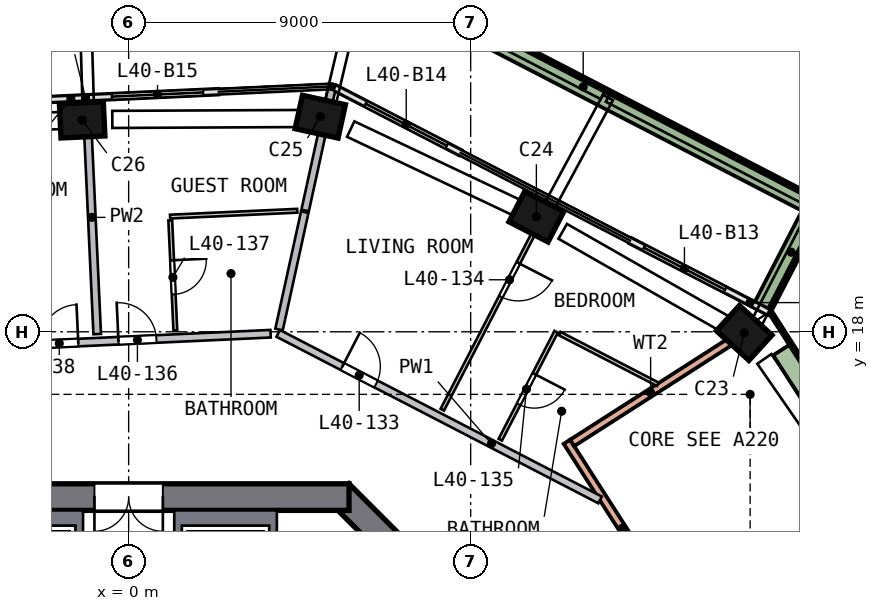
"""IFC4 building model, lengths in metres.
Left out: names, types, materials, properties, quantities, classifications, styles, units other than length and angle.
Written with IfcOpenShell. Run it as: python <this file> out.ifc"""

import sys

from ifc_helpers import new_model, si_unit, direction, frame, frame_2d, origin, origin_2d, place, context, subcontext, project, spatial, polyline, rectangle, outline, extrude, element, fill, save


model = new_model("IFC4")
c1 = context("Model", 3, precision=1e-05, world=origin(), true_north=direction((0.0, 1.0)))
c2 = subcontext(c1, "Body", "Model", "MODEL_VIEW")
j1 = project(units=[si_unit("LENGTHUNIT", "METRE"), si_unit("PLANEANGLEUNIT", "RADIAN")], contexts=[c1])
p1 = place(None, origin())
s1 = spatial("IfcSite", under=j1, at=p1, CompositionType="ELEMENT")
p2 = place(p1, origin())
s2 = spatial("IfcBuilding", under=s1, at=p2, CompositionType="ELEMENT")
p3 = place(p2, frame((0.0, 0.0, 165.5)))
s3 = spatial("IfcBuildingStorey", under=s2, at=p3, CompositionType="ELEMENT", Elevation=165.5)
p4 = place(p3, frame((16.301, 17.877, 0.0), z_axis=(-0.08569056, 0.076717303, 0.993363772), x_axis=(0.734443295, -0.668853924, 0.115010764)))
e1 = element("IfcColumn", 1, at=p4, inside=s3, PredefinedType="COLUMN", context=c2, shape_type="SweptSolid", body=[
    extrude(rectangle(XDim=1.15, YDim=0.9, at=origin_2d()), origin(), (0.0, 0.0, 1.0), 3.02),
])
p5 = place(p3, frame((10.85, 20.967, 0.0), z_axis=(-0.100111899, 0.050783742, 0.993679334), x_axis=(-0.882336041, 0.457036789, -0.112251882)))
e2 = element("IfcColumn", 2, at=p5, inside=s3, PredefinedType="COLUMN", context=c2, shape_type="SweptSolid", body=[
    extrude(rectangle(XDim=1.15, YDim=0.9, at=origin_2d()), origin(), (0.0, 0.0, 1.0), 3.019),
])
p6 = place(p3, frame((5.178, 23.632, 0.0), z_axis=(-0.112609342, 0.023766796, 0.99335506), x_axis=(0.970167516, -0.213378086, 0.115085979)))
e3 = element("IfcColumn", 3, at=p6, inside=s3, PredefinedType="COLUMN", context=c2, shape_type="SweptSolid", body=[
    extrude(rectangle(XDim=1.15, YDim=0.9, at=origin_2d()), origin(), (0.0, 0.0, 1.0), 3.02),
])
p7 = place(p3, frame((-1.087, 23.583, 0.0), z_axis=(-0.112159985, -0.006145753, 0.993671157), x_axis=(-0.992608833, -0.045945291, -0.112324243)))
e4 = element("IfcColumn", 4, at=p7, inside=s3, PredefinedType="COLUMN", context=c2, shape_type="SweptSolid", body=[
    extrude(rectangle(XDim=1.15, YDim=0.9, at=origin_2d()), origin(), (0.0, 0.0, 1.0), 3.019),
])
p8 = place(p3, frame((13.752, 5.552, 0.0), z_axis=(0.0, 0.0, 1.0), x_axis=(-0.707106781, 0.707106781, 0.0)))
e5 = element("IfcWall", 5, at=p8, inside=s3, PredefinedType="SHEAR", context=c2, shape_type="SweptSolid", body=[
    extrude(rectangle(XDim=11.598, YDim=0.7, at=frame_2d((5.799, 0.0))), origin(), (0.0, 0.0, 1.0), 3.5),
])
p9 = place(p8, frame((2.099, 0.0, 0.0)))
e6 = element("IfcOpeningElement", 6, at=p9, cuts=e5, PredefinedType="OPENING", context=c2, shape_type="SweptSolid", body=[
    extrude(rectangle(XDim=1.2, YDim=2.1, at=frame_2d((0.6, 1.05))), frame((0.0, 0.36, 0.0), z_axis=(0.0, -1.0, 0.0), x_axis=(1.0, 0.0, 0.0)), (0.0, 0.0, 1.0), 0.72),
])
p10 = place(p3, frame((5.799, 13.65, 0.0), z_axis=(0.0, 0.0, 1.0), x_axis=(-1.0, 0.0, 0.0)))
e7 = element("IfcWall", 7, at=p10, inside=s3, PredefinedType="SHEAR", context=c2, shape_type="SweptSolid", body=[
    extrude(rectangle(XDim=11.598, YDim=0.7, at=frame_2d((5.799, 0.0))), origin(), (0.0, 0.0, 1.0), 3.5),
])
p11 = place(p10, frame((4.899, 0.0, 0.0)))
e8 = element("IfcOpeningElement", 8, at=p11, cuts=e7, PredefinedType="OPENING", context=c2, shape_type="SweptSolid", body=[
    extrude(rectangle(XDim=1.8, YDim=2.1, at=frame_2d((0.9, 1.05))), frame((0.0, 0.36, 0.0), z_axis=(0.0, -1.0, 0.0), x_axis=(1.0, 0.0, 0.0)), (0.0, 0.0, 1.0), 0.72),
])
p12 = place(p3, frame((16.834, 18.518, 0.0), z_axis=(0.0, 0.0, 1.0), x_axis=(-0.888127677, 0.459596813, 0.0)))
e9 = element("IfcWall", 9, at=p12, inside=s3, PredefinedType="SOLIDWALL", context=c2, shape_type="SweptSolid", body=[
    extrude(rectangle(XDim=4.087, YDim=0.15, at=frame_2d((2.043, 0.0))), origin(), (0.0, 0.0, 1.0), 2.935),
])
p13 = place(p12, frame((1.287, 0.0, 0.0)))
e10 = element("IfcOpeningElement", 10, at=p13, cuts=e9, PredefinedType="OPENING", context=c2, shape_type="SweptSolid", body=[
    extrude(rectangle(XDim=2.4, YDim=2.4, at=frame_2d((1.2, 1.2))), frame((0.0, 0.085, 0.0), z_axis=(0.0, -1.0, 0.0), x_axis=(1.0, 0.0, 0.0)), (0.0, 0.0, 1.0), 0.17),
])
p14 = place(p3, frame((8.725, 22.714, 0.0), z_axis=(0.0, 0.0, 1.0), x_axis=(-0.888115772, 0.459619817, 0.0)))
e11 = element("IfcWall", 11, at=p14, inside=s3, PredefinedType="SOLIDWALL", context=c2, shape_type="SweptSolid", body=[
    extrude(rectangle(XDim=3.71, YDim=0.15, at=frame_2d((1.855, 0.0))), origin(), (0.0, 0.0, 1.0), 2.935),
])
p15 = place(p14, frame((0.4, 0.0, 0.0)))
e12 = element("IfcOpeningElement", 12, at=p15, cuts=e11, PredefinedType="OPENING", context=c2, shape_type="SweptSolid", body=[
    extrude(rectangle(XDim=2.4, YDim=2.4, at=frame_2d((1.2, 1.2))), frame((0.0, 0.085, 0.0), z_axis=(0.0, -1.0, 0.0), x_axis=(1.0, 0.0, 0.0)), (0.0, 0.0, 1.0), 0.17),
])
p16 = place(p3, frame((2.357, 24.318, 0.0), z_axis=(0.0, 0.0, 1.0), x_axis=(-0.998940688, -0.046016327, 0.0)))
e13 = element("IfcWall", 13, at=p16, inside=s3, PredefinedType="SOLIDWALL", context=c2, shape_type="SweptSolid", body=[
    extrude(rectangle(XDim=3.475, YDim=0.15, at=frame_2d((1.738, 0.0))), origin(), (0.0, 0.0, 1.0), 2.935),
])
p17 = place(p16, frame((0.4, 0.0, 0.0)))
e14 = element("IfcOpeningElement", 14, at=p17, cuts=e13, PredefinedType="OPENING", context=c2, shape_type="SweptSolid", body=[
    extrude(rectangle(XDim=2.4, YDim=2.4, at=frame_2d((1.2, 1.2))), frame((0.0, 0.085, 0.0), z_axis=(0.0, -1.0, 0.0), x_axis=(1.0, 0.0, 0.0)), (0.0, 0.0, 1.0), 0.17),
])
p18 = place(p3, frame((-1.114, 24.158, 0.0), z_axis=(0.0, 0.0, 1.0), x_axis=(-0.99893729, -0.046090026, 0.0)))
e15 = element("IfcWall", 15, at=p18, inside=s3, PredefinedType="SOLIDWALL", context=c2, shape_type="SweptSolid", body=[
    extrude(rectangle(XDim=3.814, YDim=0.15, at=frame_2d((1.907, 0.0))), origin(), (0.0, 0.0, 1.0), 2.935),
])
p19 = place(p18, frame((1.014, 0.0, 0.0)))
e16 = element("IfcOpeningElement", 16, at=p19, cuts=e15, PredefinedType="OPENING", context=c2, shape_type="SweptSolid", body=[
    extrude(rectangle(XDim=2.4, YDim=2.4, at=frame_2d((1.2, 1.2))), frame((0.0, 0.085, 0.0), z_axis=(0.0, -1.0, 0.0), x_axis=(1.0, 0.0, 0.0)), (0.0, 0.0, 1.0), 0.17),
])
p20 = place(p3, frame((16.7, 18.673, 0.0), z_axis=(0.0, 0.0, 1.0), x_axis=(0.459595237, 0.888128492, 0.0)))
e17 = element("IfcWall", 17, at=p20, inside=s3, PredefinedType="SOLIDWALL", context=c2, shape_type="SweptSolid", body=[
    extrude(rectangle(XDim=3.199, YDim=0.5, at=frame_2d((1.6, 0.0))), origin(), (0.0, 0.0, 1.0), 0.7),
])
p21 = place(p3, frame((17.833, 21.407, 0.0), z_axis=(0.0, 0.0, 1.0), x_axis=(-0.888141512, 0.459570076, 0.0)))
e18 = element("IfcWall", 18, at=p21, inside=s3, PredefinedType="SOLIDWALL", context=c2, shape_type="SweptSolid", body=[
    extrude(rectangle(XDim=13.224, YDim=0.5, at=frame_2d((6.612, 0.0))), origin(), (0.0, 0.0, 1.0), 0.7),
])
p22 = place(p3, frame((11.532, 15.105, 0.0), z_axis=(0.0, 0.0, 1.0), x_axis=(0.53936062, -0.842074891, 0.0)))
e19 = element("IfcWall", 19, at=p22, inside=s3, PredefinedType="SOLIDWALL", context=c2, shape_type="SweptSolid", body=[
    extrude(rectangle(XDim=13.0, YDim=0.2, at=frame_2d((6.5, 0.0))), origin(), (0.0, 0.0, 1.0), 3.0),
])
p23 = place(p22, frame((5.6, 0.0, 0.0)))
e20 = element("IfcOpeningElement", 20, at=p23, cuts=e19, PredefinedType="OPENING", context=c2, shape_type="SweptSolid", body=[
    extrude(rectangle(XDim=1.8, YDim=2.4, at=frame_2d((0.9, 1.2))), frame((0.0, 0.11, 0.0), z_axis=(0.0, -1.0, 0.0), x_axis=(1.0, 0.0, 0.0)), (0.0, 0.0, 1.0), 0.22),
])
p24 = place(p3, frame((15.8, 17.72, 0.0), z_axis=(0.0, 0.0, 1.0), x_axis=(-0.842081483, -0.539350327, 0.0)))
e21 = element("IfcWall", 21, at=p24, inside=s3, PredefinedType="SOLIDWALL", context=c2, shape_type="SweptSolid", body=[
    extrude(rectangle(XDim=4.904, YDim=0.2, at=frame_2d((2.452, 0.0))), origin(), (0.0, 0.0, 1.0), 3.0),
])
p25 = place(p3, frame((23.848, 7.651, 0.0), z_axis=(0.0, 0.0, 1.0), x_axis=(-0.539354737, 0.842078659, 0.0)))
e22 = element("IfcWall", 22, at=p25, inside=s3, PredefinedType="SOLIDWALL", context=c2, shape_type="SweptSolid", body=[
    extrude(rectangle(XDim=12.84, YDim=0.1, at=frame_2d((6.42, 0.0))), origin(), (0.0, 0.0, 1.0), 0.7),
])
p26 = place(p3, frame((19.586, 13.749, 0.0), z_axis=(0.0, 0.0, 1.0), x_axis=(-0.539375623, 0.842065281, 0.0)))
e23 = element("IfcWall", 23, at=p26, inside=s3, PredefinedType="SOLIDWALL", context=c2, shape_type="SweptSolid", body=[
    extrude(rectangle(XDim=4.476, YDim=0.5, at=frame_2d((2.238, 0.0))), origin(), (0.0, 0.0, 1.0), 0.7),
])
p27 = place(p3, origin())
e24 = element("IfcWall", 24, at=p27, inside=s3, PredefinedType="SOLIDWALL", context=c2, shape_type="SweptSolid", body=[
    extrude(outline(polyline([(3.9, 13.3), (3.9, 10.9), (3.7, 10.9), (3.7, 12.9), (1.4, 12.9), (1.4, 10.9), (1.2, 10.9), (1.2, 13.3), (3.9, 13.3)])), origin(), (0.0, 0.0, 1.0), 3.0),
])
p28 = place(p3, origin())
e25 = element("IfcWall", 25, at=p28, inside=s3, PredefinedType="SOLIDWALL", context=c2, shape_type="SweptSolid", body=[
    extrude(outline(polyline([(-3.9, 10.9), (-3.9, 13.3), (-1.2, 13.3), (-1.2, 10.9), (-1.4, 10.9), (-1.4, 12.9), (-3.7, 12.9), (-3.7, 10.9), (-3.9, 10.9)])), origin(), (0.0, 0.0, 1.0), 3.0),
])
p29 = place(p3, frame((-5.571, 17.52, 0.0), z_axis=(0.0, 0.0, 1.0), x_axis=(0.998938336, 0.046067354, 0.0)))
e26 = element("IfcWall", 26, at=p29, inside=s3, PredefinedType="SOLIDWALL", context=c2, shape_type="SweptSolid", body=[
    extrude(rectangle(XDim=9.317, YDim=0.2, at=frame_2d((4.658, 0.0))), origin(), (0.0, 0.0, 1.0), 3.0),
])
p30 = place(p29, frame((5.308, 0.0, 0.0)))
e27 = element("IfcOpeningElement", 27, at=p30, cuts=e26, PredefinedType="OPENING", context=c2, shape_type="SweptSolid", body=[
    extrude(rectangle(XDim=1.0, YDim=2.1, at=frame_2d((0.5, 1.05))), frame((0.0, 0.11, 0.0), z_axis=(0.0, -1.0, 0.0), x_axis=(1.0, 0.0, 0.0)), (0.0, 0.0, 1.0), 0.22),
])
p31 = place(p29, frame((3.25, 0.0, 0.0)))
e28 = element("IfcOpeningElement", 28, at=p31, cuts=e26, PredefinedType="OPENING", context=c2, shape_type="SweptSolid", body=[
    extrude(rectangle(XDim=1.0, YDim=2.1, at=frame_2d((0.5, 1.05))), frame((0.0, 0.11, 0.0), z_axis=(0.0, -1.0, 0.0), x_axis=(1.0, 0.0, 0.0)), (0.0, 0.0, 1.0), 0.22),
])
p32 = place(p3, frame((3.935, 17.959, 0.0), z_axis=(0.0, 0.0, 1.0), x_axis=(0.888130454, -0.459591446, 0.0)))
e29 = element("IfcWall", 29, at=p32, inside=s3, PredefinedType="SOLIDWALL", context=c2, shape_type="SweptSolid", body=[
    extrude(rectangle(XDim=9.537, YDim=0.2, at=frame_2d((4.769, 0.0))), origin(), (0.0, 0.0, 1.0), 3.0),
])
p33 = place(p32, frame((1.9, 0.0, 0.0)))
e30 = element("IfcOpeningElement", 30, at=p33, cuts=e29, PredefinedType="OPENING", context=c2, shape_type="SweptSolid", body=[
    extrude(rectangle(XDim=1.0, YDim=2.1, at=frame_2d((0.5, 1.05))), frame((0.0, 0.11, 0.0), z_axis=(0.0, -1.0, 0.0), x_axis=(1.0, 0.0, 0.0)), (0.0, 0.0, 1.0), 0.22),
])
p34 = place(p3, frame((-0.827, 17.939, 0.0), z_axis=(0.0, 0.0, 1.0), x_axis=(-0.046048699, 0.998939196, 0.0)))
e31 = element("IfcWall", 31, at=p34, inside=s3, PredefinedType="SOLIDWALL", context=c2, shape_type="SweptSolid", body=[
    extrude(rectangle(XDim=6.15, YDim=0.2, at=frame_2d((3.075, 0.0))), origin(), (0.0, 0.0, 1.0), 3.0),
])
p35 = place(p3, frame((3.958, 18.06, 0.0), z_axis=(0.0, 0.0, 1.0), x_axis=(0.214067658, 0.976818836, 0.0)))
e32 = element("IfcWall", 32, at=p35, inside=s3, PredefinedType="SOLIDWALL", context=c2, shape_type="SweptSolid", body=[
    extrude(rectangle(XDim=3.161, YDim=0.2, at=frame_2d((1.581, 0.0))), origin(), (0.0, 0.0, 1.0), 3.0),
])
p36 = place(p3, frame((4.644, 21.193, 0.0), z_axis=(0.0, 0.0, 1.0), x_axis=(0.213995362, 0.976834676, 0.0)))
e33 = element("IfcWall", 33, at=p36, inside=s3, PredefinedType="SOLIDWALL", context=c2, shape_type="SweptSolid", body=[
    extrude(rectangle(XDim=3.269, YDim=0.2, at=frame_2d((1.634, 0.0))), origin(), (0.0, 0.0, 1.0), 3.0),
])
p37 = place(p3, frame((1.095, 20.931, 0.0), z_axis=(0.0, 0.0, 1.0), x_axis=(0.046053066, -0.998938995, 0.0)))
e34 = element("IfcWall", 34, at=p37, inside=s3, PredefinedType="PARTITIONING", context=c2, shape_type="SweptSolid", body=[
    extrude(rectangle(XDim=2.9, YDim=0.1, at=frame_2d((1.45, 0.0))), origin(), (0.0, 0.0, 1.0), 3.0),
])
p38 = place(p37, frame((1.05, 0.0, 0.0)))
e35 = element("IfcOpeningElement", 35, at=p38, cuts=e34, PredefinedType="OPENING", context=c2, shape_type="SweptSolid", body=[
    extrude(rectangle(XDim=0.9, YDim=2.1, at=frame_2d((0.45, 1.05))), frame((0.0, 0.06, 0.0), z_axis=(0.0, -1.0, 0.0), x_axis=(1.0, 0.0, 0.0)), (0.0, 0.0, 1.0), 0.12),
])
p39 = place(p3, frame((1.091, 21.031, 0.0), z_axis=(0.0, 0.0, 1.0), x_axis=(0.998938881, 0.046055542, 0.0)))
e36 = element("IfcWall", 36, at=p39, inside=s3, PredefinedType="PARTITIONING", context=c2, shape_type="SweptSolid", body=[
    extrude(rectangle(XDim=3.35, YDim=0.1, at=frame_2d((1.675, 0.0))), origin(), (0.0, 0.0, 1.0), 3.0),
])
p40 = place(p3, frame((11.08, 21.412, 0.0), z_axis=(0.0, 0.0, 1.0), x_axis=(-0.45954063, -0.888156748, 0.0)))
e37 = element("IfcWall", 37, at=p40, inside=s3, PredefinedType="PARTITIONING", context=c2, shape_type="SweptSolid", body=[
    extrude(rectangle(XDim=6.15, YDim=0.1, at=frame_2d((3.075, 0.0))), origin(), (0.0, 0.0, 1.0), 3.0),
])
p41 = place(p40, frame((1.8, 0.0, 0.0)))
e38 = element("IfcOpeningElement", 38, at=p41, cuts=e37, PredefinedType="OPENING", context=c2, shape_type="SweptSolid", body=[
    extrude(rectangle(XDim=1.0, YDim=2.1, at=frame_2d((0.5, 1.05))), frame((0.0, 0.06, 0.0), z_axis=(0.0, -1.0, 0.0), x_axis=(1.0, 0.0, 0.0)), (0.0, 0.0, 1.0), 0.12),
])
p42 = place(p3, frame((11.25, 18.002, 0.0), z_axis=(0.0, 0.0, 1.0), x_axis=(-0.459591028, -0.88813067, 0.0)))
e39 = element("IfcWall", 39, at=p42, inside=s3, PredefinedType="PARTITIONING", context=c2, shape_type="SweptSolid", body=[
    extrude(rectangle(XDim=3.2, YDim=0.1, at=frame_2d((1.6, 0.0))), origin(), (0.0, 0.0, 1.0), 3.0),
])
p43 = place(p42, frame((1.25, 0.0, 0.0)))
e40 = element("IfcOpeningElement", 40, at=p43, cuts=e39, PredefinedType="OPENING", context=c2, shape_type="SweptSolid", body=[
    extrude(rectangle(XDim=0.9, YDim=2.1, at=frame_2d((0.45, 1.05))), frame((0.0, 0.06, 0.0), z_axis=(0.0, -1.0, 0.0), x_axis=(1.0, 0.0, 0.0)), (0.0, 0.0, 1.0), 0.12),
])
p44 = place(p3, frame((13.925, 16.618, 0.0), z_axis=(0.0, 0.0, 1.0), x_axis=(-0.888153926, 0.459546084, 0.0)))
e41 = element("IfcWall", 41, at=p44, inside=s3, PredefinedType="PARTITIONING", context=c2, shape_type="SweptSolid", body=[
    extrude(rectangle(XDim=2.912, YDim=0.1, at=frame_2d((1.456, 0.0))), origin(), (0.0, 0.0, 1.0), 3.0),
])
p45 = place(p13, origin())
e42 = element("IfcDoor", 42, at=p45, inside=s3, OperationType="SLIDING_TO_LEFT", PredefinedType="DOOR", context=c2, shape_type="SweptSolid", body=[
    extrude(rectangle(XDim=2.4, YDim=2.4, at=frame_2d((1.2, 1.2))), frame((0.0, 0.025, 0.0), z_axis=(0.0, -1.0, 0.0), x_axis=(1.0, 0.0, 0.0)), (0.0, 0.0, 1.0), 0.05),
])
fill(e10, e42)
p46 = place(p15, origin())
e43 = element("IfcDoor", 43, at=p46, inside=s3, OperationType="SLIDING_TO_RIGHT", PredefinedType="DOOR", context=c2, shape_type="SweptSolid", body=[
    extrude(rectangle(XDim=2.4, YDim=2.4, at=frame_2d((1.2, 1.2))), frame((0.0, 0.025, 0.0), z_axis=(0.0, -1.0, 0.0), x_axis=(1.0, 0.0, 0.0)), (0.0, 0.0, 1.0), 0.05),
])
fill(e12, e43)
p47 = place(p17, origin())
e44 = element("IfcDoor", 44, at=p47, inside=s3, OperationType="SLIDING_TO_RIGHT", PredefinedType="DOOR", context=c2, shape_type="SweptSolid", body=[
    extrude(rectangle(XDim=2.4, YDim=2.4, at=frame_2d((1.2, 1.2))), frame((0.0, 0.025, 0.0), z_axis=(0.0, -1.0, 0.0), x_axis=(1.0, 0.0, 0.0)), (0.0, 0.0, 1.0), 0.05),
])
fill(e14, e44)
p48 = place(p11, origin())
e45 = element("IfcDoor", 45, at=p48, inside=s3, OperationType="DOUBLE_DOOR_SINGLE_SWING", PredefinedType="DOOR", context=c2, shape_type="SweptSolid", body=[
    extrude(rectangle(XDim=1.8, YDim=2.1, at=frame_2d((0.9, 1.05))), frame((0.0, 0.025, 0.0), z_axis=(0.0, -1.0, 0.0), x_axis=(1.0, 0.0, 0.0)), (0.0, 0.0, 1.0), 0.05),
])
fill(e8, e45)
p49 = place(p33, origin())
e46 = element("IfcDoor", 46, at=p49, inside=s3, OperationType="SINGLE_SWING_LEFT", PredefinedType="DOOR", context=c2, shape_type="SweptSolid", body=[
    extrude(rectangle(XDim=1.0, YDim=2.1, at=frame_2d((0.5, 1.05))), frame((0.0, 0.025, 0.0), z_axis=(0.0, -1.0, 0.0), x_axis=(1.0, 0.0, 0.0)), (0.0, 0.0, 1.0), 0.05),
])
fill(e30, e46)
p50 = place(p41, origin())
e47 = element("IfcDoor", 47, at=p50, inside=s3, OperationType="SINGLE_SWING_LEFT", PredefinedType="DOOR", context=c2, shape_type="SweptSolid", body=[
    extrude(rectangle(XDim=1.0, YDim=2.1, at=frame_2d((0.5, 1.05))), frame((0.0, 0.025, 0.0), z_axis=(0.0, -1.0, 0.0), x_axis=(1.0, 0.0, 0.0)), (0.0, 0.0, 1.0), 0.05),
])
fill(e38, e47)
p51 = place(p43, origin())
e48 = element("IfcDoor", 48, at=p51, inside=s3, OperationType="SINGLE_SWING_LEFT", PredefinedType="DOOR", context=c2, shape_type="SweptSolid", body=[
    extrude(rectangle(XDim=0.9, YDim=2.1, at=frame_2d((0.45, 1.05))), frame((0.0, 0.025, 0.0), z_axis=(0.0, -1.0, 0.0), x_axis=(1.0, 0.0, 0.0)), (0.0, 0.0, 1.0), 0.05),
])
fill(e40, e48)
p52 = place(p30, origin())
e49 = element("IfcDoor", 49, at=p52, inside=s3, OperationType="SINGLE_SWING_LEFT", PredefinedType="DOOR", context=c2, shape_type="SweptSolid", body=[
    extrude(rectangle(XDim=1.0, YDim=2.1, at=frame_2d((0.5, 1.05))), frame((0.0, 0.025, 0.0), z_axis=(0.0, -1.0, 0.0), x_axis=(1.0, 0.0, 0.0)), (0.0, 0.0, 1.0), 0.05),
])
fill(e27, e49)
p53 = place(p38, origin())
e50 = element("IfcDoor", 50, at=p53, inside=s3, OperationType="SINGLE_SWING_LEFT", PredefinedType="DOOR", context=c2, shape_type="SweptSolid", body=[
    extrude(rectangle(XDim=0.9, YDim=2.1, at=frame_2d((0.45, 1.05))), frame((0.0, 0.025, 0.0), z_axis=(0.0, -1.0, 0.0), x_axis=(1.0, 0.0, 0.0)), (0.0, 0.0, 1.0), 0.05),
])
fill(e35, e50)
p54 = place(p31, origin())
e51 = element("IfcDoor", 51, at=p54, inside=s3, OperationType="SINGLE_SWING_RIGHT", PredefinedType="DOOR", context=c2, shape_type="SweptSolid", body=[
    extrude(rectangle(XDim=1.0, YDim=2.1, at=frame_2d((0.5, 1.05))), frame((0.0, 0.025, 0.0), z_axis=(0.0, -1.0, 0.0), x_axis=(1.0, 0.0, 0.0)), (0.0, 0.0, 1.0), 0.05),
])
fill(e28, e51)
save(model, sys.argv[1])
